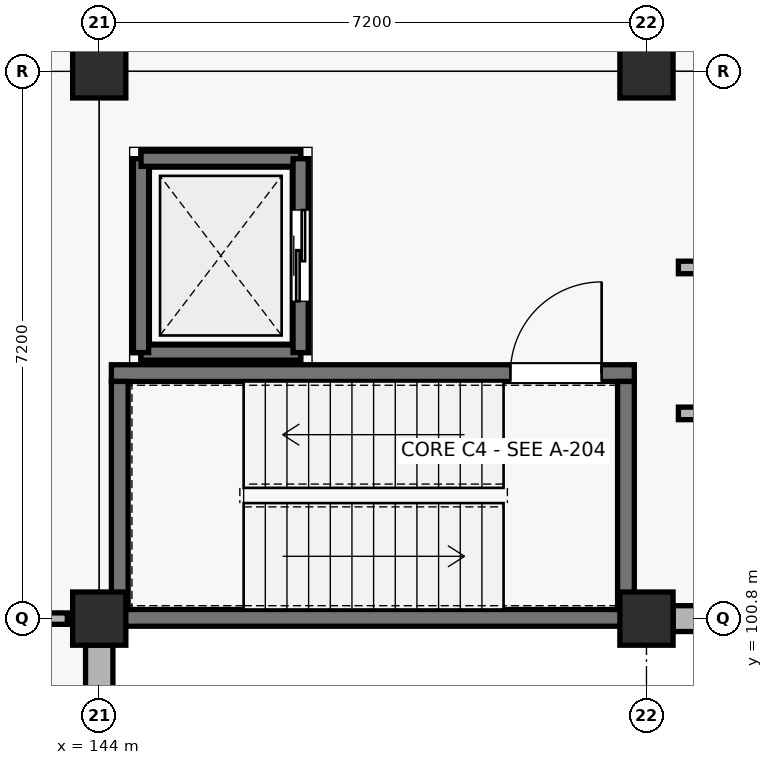
"""IFC4 building model, lengths in metres.
Left out: names, types, materials, properties, quantities, classifications, styles, units other than length and angle.
Written with IfcOpenShell. Run it as: python <this file> out.ifc"""

import sys

from ifc_helpers import new_model, si_unit, direction, frame, frame_2d, origin, origin_2d, place, context, subcontext, project, spatial, rectangle, extrude, element, fill, save


model = new_model("IFC4")
c1 = context("Model", 3, precision=1e-05, world=origin(), true_north=direction((0.0, 1.0)))
c2 = subcontext(c1, "Body", "Model", "MODEL_VIEW")
j1 = project(units=[si_unit("LENGTHUNIT", "METRE"), si_unit("PLANEANGLEUNIT", "RADIAN")], contexts=[c1])
p1 = place(None, origin())
s1 = spatial("IfcSite", under=j1, at=p1, CompositionType="ELEMENT")
p2 = place(p1, origin())
s2 = spatial("IfcBuilding", under=s1, at=p2, CompositionType="ELEMENT")
p3 = place(p2, origin())
s3 = spatial("IfcBuildingStorey", under=s2, at=p3, CompositionType="ELEMENT", Elevation=0.0)
for number, where, z_axis, x_axis in (
    (1, (144.0, 100.8, -0.25), (0.0, 0.0, 1.0), (1.0, 0.0, 0.0)),
    (2, (144.0, 108.0, -0.25), (0.0, 0.0, 1.0), (1.0, 0.0, 0.0)),
    (3, (151.2, 100.8, -0.25), (0.0, 0.0, 1.0), (1.0, 0.0, 0.0)),
    (4, (151.2, 108.0, -0.25), (0.0, 0.0, 1.0), (1.0, 0.0, 0.0)),
):
    element("IfcColumn", number, at=place(p3, frame(where, z_axis=z_axis, x_axis=x_axis)), inside=s3, PredefinedType="COLUMN", context=c2, shape_type="SweptSolid", body=[
        extrude(rectangle(XDim=0.7, YDim=0.7, at=origin_2d()), origin(), (0.0, 0.0, 1.0), 4.75),
    ])
p4 = place(p3, frame((144.0, 93.925, 0.0), z_axis=(0.0, 0.0, 1.0), x_axis=(0.0, 1.0, 0.0)))
e5 = element("IfcWall", 5, at=p4, inside=s3, PredefinedType="SOLIDWALL", context=c2, shape_type="SweptSolid", body=[
    extrude(rectangle(XDim=6.525, YDim=0.36, at=frame_2d((3.262, 0.0))), origin(), (0.0, 0.0, 1.0), 3.52),
])
p5 = place(p4, frame((1.0, 0.0, 0.9)))
e6 = element("IfcOpeningElement", 6, at=p5, cuts=e5, PredefinedType="OPENING", context=c2, shape_type="SweptSolid", body=[
    extrude(rectangle(XDim=1.5, YDim=1.25, at=frame_2d((0.75, 0.625))), frame((0.0, 0.19, 0.0), z_axis=(0.0, -1.0, 0.0), x_axis=(1.0, 0.0, 0.0)), (0.0, 0.0, 1.0), 0.38),
])
p6 = place(p4, frame((4.025, 0.0, 0.9)))
e7 = element("IfcOpeningElement", 7, at=p6, cuts=e5, PredefinedType="OPENING", context=c2, shape_type="SweptSolid", body=[
    extrude(rectangle(XDim=1.5, YDim=1.25, at=frame_2d((0.75, 0.625))), frame((0.0, 0.19, 0.0), z_axis=(0.0, -1.0, 0.0), x_axis=(1.0, 0.0, 0.0)), (0.0, 0.0, 1.0), 0.38),
])
p7 = place(p3, frame((151.55, 100.8, 0.0), z_axis=(0.0, 0.0, 1.0), x_axis=(1.0, 0.0, 0.0)))
e8 = element("IfcWall", 8, at=p7, inside=s3, PredefinedType="SOLIDWALL", context=c2, shape_type="SweptSolid", body=[
    extrude(rectangle(XDim=6.5, YDim=0.34, at=frame_2d((3.25, 0.0))), origin(), (0.0, 0.0, 1.0), 3.47),
])
p8 = place(p7, frame((1.225, 0.0, 0.9)))
e9 = element("IfcOpeningElement", 9, at=p8, cuts=e8, PredefinedType="OPENING", context=c2, shape_type="SweptSolid", body=[
    extrude(rectangle(XDim=1.05, YDim=1.75, at=frame_2d((0.525, 0.875))), frame((0.0, 0.18, 0.0), z_axis=(0.0, -1.0, 0.0), x_axis=(1.0, 0.0, 0.0)), (0.0, 0.0, 1.0), 0.36),
])
p9 = place(p7, frame((4.225, 0.0, 0.9)))
e10 = element("IfcOpeningElement", 10, at=p9, cuts=e8, PredefinedType="OPENING", context=c2, shape_type="SweptSolid", body=[
    extrude(rectangle(XDim=1.05, YDim=1.75, at=frame_2d((0.525, 0.875))), frame((0.0, 0.18, 0.0), z_axis=(0.0, -1.0, 0.0), x_axis=(1.0, 0.0, 0.0)), (0.0, 0.0, 1.0), 0.36),
])
p10 = place(p3, frame((144.55, 104.3, -0.95), z_axis=(0.0, 0.0, 1.0), x_axis=(1.0, 0.0, 0.0)))
e11 = element("IfcWall", 11, at=p10, inside=s3, PredefinedType="SHEAR", context=c2, shape_type="SweptSolid", body=[
    extrude(rectangle(XDim=2.1, YDim=0.22, at=frame_2d((1.05, 0.0))), origin(), (0.0, 0.0, 1.0), 0.95),
])
p11 = place(p3, frame((146.65, 104.3, -0.95), z_axis=(0.0, 0.0, 1.0), x_axis=(0.0, 1.0, 0.0)))
e12 = element("IfcWall", 12, at=p11, inside=s3, PredefinedType="SHEAR", context=c2, shape_type="SweptSolid", body=[
    extrude(rectangle(XDim=2.55, YDim=0.22, at=frame_2d((1.275, 0.0))), origin(), (0.0, 0.0, 1.0), 0.95),
])
p12 = place(p3, frame((146.65, 106.85, -0.95), z_axis=(0.0, 0.0, 1.0), x_axis=(-1.0, 0.0, 0.0)))
e13 = element("IfcWall", 13, at=p12, inside=s3, PredefinedType="SHEAR", context=c2, shape_type="SweptSolid", body=[
    extrude(rectangle(XDim=2.1, YDim=0.22, at=frame_2d((1.05, 0.0))), origin(), (0.0, 0.0, 1.0), 0.95),
])
p13 = place(p3, frame((144.55, 106.85, -0.95), z_axis=(0.0, 0.0, 1.0), x_axis=(0.0, -1.0, 0.0)))
e14 = element("IfcWall", 14, at=p13, inside=s3, PredefinedType="SHEAR", context=c2, shape_type="SweptSolid", body=[
    extrude(rectangle(XDim=2.55, YDim=0.22, at=frame_2d((1.275, 0.0))), origin(), (0.0, 0.0, 1.0), 0.95),
])
p14 = place(p3, frame((144.16, 100.81, -0.25), z_axis=(0.0, 0.0, 1.0), x_axis=(1.0, 0.0, 0.0)))
e15 = element("IfcWall", 15, at=p14, inside=s3, PredefinedType="SHEAR", context=c2, shape_type="SweptSolid", body=[
    extrude(rectangle(XDim=6.88, YDim=0.22, at=frame_2d((3.44, 0.0))), origin(), (0.0, 0.0, 1.0), 4.47),
])
p15 = place(p3, frame((144.16, 104.03, -0.25), z_axis=(0.0, 0.0, 1.0), x_axis=(1.0, 0.0, 0.0)))
e16 = element("IfcWall", 16, at=p15, inside=s3, PredefinedType="SHEAR", context=c2, shape_type="SweptSolid", body=[
    extrude(rectangle(XDim=6.88, YDim=0.22, at=frame_2d((3.44, 0.0))), origin(), (0.0, 0.0, 1.0), 4.47),
])
p16 = place(p15, frame((5.25, 0.0, 0.25)))
e17 = element("IfcOpeningElement", 17, at=p16, cuts=e16, PredefinedType="OPENING", context=c2, shape_type="SweptSolid", body=[
    extrude(rectangle(XDim=1.2, YDim=2.15, at=frame_2d((0.6, 1.075))), frame((0.0, 0.12, 0.0), z_axis=(0.0, -1.0, 0.0), x_axis=(1.0, 0.0, 0.0)), (0.0, 0.0, 1.0), 0.24),
])
for number, where, z_axis, x_axis in (
    (18, (144.27, 100.92, -0.25), (0.0, 0.0, 1.0), (0.0, 1.0, 0.0)),
    (19, (150.93, 100.92, -0.25), (0.0, 0.0, 1.0), (0.0, 1.0, 0.0)),
):
    element("IfcWall", number, at=place(p3, frame(where, z_axis=z_axis, x_axis=x_axis)), inside=s3, PredefinedType="SHEAR", context=c2, shape_type="SweptSolid", body=[
        extrude(rectangle(XDim=3.0, YDim=0.22, at=frame_2d((1.5, 0.0))), origin(), (0.0, 0.0, 1.0), 4.47),
    ])
p17 = place(p3, frame((144.55, 104.3, 0.0), z_axis=(0.0, 0.0, 1.0), x_axis=(1.0, 0.0, 0.0)))
e20 = element("IfcWall", 20, at=p17, inside=s3, PredefinedType="SHEAR", context=c2, shape_type="SweptSolid", body=[
    extrude(rectangle(XDim=2.1, YDim=0.2, at=frame_2d((1.05, 0.0))), origin(), (0.0, 0.0, 1.0), 4.22),
])
p18 = place(p3, frame((144.55, 104.3, 0.0), z_axis=(0.0, 0.0, 1.0), x_axis=(0.0, 1.0, 0.0)))
e21 = element("IfcWall", 21, at=p18, inside=s3, PredefinedType="SHEAR", context=c2, shape_type="SweptSolid", body=[
    extrude(rectangle(XDim=2.55, YDim=0.2, at=frame_2d((1.275, 0.0))), origin(), (0.0, 0.0, 1.0), 4.22),
])
p19 = place(p3, frame((144.55, 106.85, 0.0), z_axis=(0.0, 0.0, 1.0), x_axis=(1.0, 0.0, 0.0)))
e22 = element("IfcWall", 22, at=p19, inside=s3, PredefinedType="SHEAR", context=c2, shape_type="SweptSolid", body=[
    extrude(rectangle(XDim=2.1, YDim=0.2, at=frame_2d((1.05, 0.0))), origin(), (0.0, 0.0, 1.0), 4.22),
])
p20 = place(p3, frame((146.65, 104.3, 0.0), z_axis=(0.0, 0.0, 1.0), x_axis=(0.0, 1.0, 0.0)))
e23 = element("IfcWall", 23, at=p20, inside=s3, PredefinedType="SHEAR", context=c2, shape_type="SweptSolid", body=[
    extrude(rectangle(XDim=2.55, YDim=0.2, at=frame_2d((1.275, 0.0))), origin(), (0.0, 0.0, 1.0), 4.22),
])
p21 = place(p20, frame((0.675, 0.0, 0.0)))
e24 = element("IfcOpeningElement", 24, at=p21, cuts=e23, PredefinedType="OPENING", context=c2, shape_type="SweptSolid", body=[
    extrude(rectangle(XDim=1.2, YDim=2.15, at=frame_2d((0.6, 1.075))), frame((0.0, 0.11, 0.0), z_axis=(0.0, -1.0, 0.0), x_axis=(1.0, 0.0, 0.0)), (0.0, 0.0, 1.0), 0.22),
])
p22 = place(p3, frame((141.42, 100.8, 0.0), z_axis=(0.0, 0.0, 1.0), x_axis=(1.0, 0.0, 0.0)))
e25 = element("IfcWall", 25, at=p22, inside=s3, PredefinedType="PARTITIONING", context=c2, shape_type="SweptSolid", body=[
    extrude(rectangle(XDim=2.16, YDim=0.15, at=frame_2d((1.08, 0.0))), origin(), (0.0, 0.0, 1.0), 3.36),
])
p23 = place(p3, frame((151.62, 103.5, 0.0), z_axis=(0.0, 0.0, 1.0), x_axis=(1.0, 0.0, 0.0)))
e26 = element("IfcWall", 26, at=p23, inside=s3, PredefinedType="PARTITIONING", context=c2, shape_type="SweptSolid", body=[
    extrude(rectangle(XDim=6.36, YDim=0.165, at=frame_2d((3.18, 0.0))), origin(), (0.0, 0.0, 1.0), 3.36),
])
p24 = place(p23, frame((2.43, 0.0, 0.0)))
e27 = element("IfcOpeningElement", 27, at=p24, cuts=e26, PredefinedType="OPENING", context=c2, shape_type="SweptSolid", body=[
    extrude(rectangle(XDim=1.5, YDim=2.2, at=frame_2d((0.75, 1.1))), frame((0.0, 0.093, 0.0), z_axis=(0.0, -1.0, 0.0), x_axis=(1.0, 0.0, 0.0)), (0.0, 0.0, 1.0), 0.185),
])
p25 = place(p3, frame((151.62, 105.42, 0.0), z_axis=(0.0, 0.0, 1.0), x_axis=(1.0, 0.0, 0.0)))
e28 = element("IfcWall", 28, at=p25, inside=s3, PredefinedType="PARTITIONING", context=c2, shape_type="SweptSolid", body=[
    extrude(rectangle(XDim=6.36, YDim=0.165, at=frame_2d((3.18, 0.0))), origin(), (0.0, 0.0, 1.0), 3.36),
])
p26 = place(p25, frame((2.48, 0.0, 0.0)))
e29 = element("IfcOpeningElement", 29, at=p26, cuts=e28, PredefinedType="OPENING", context=c2, shape_type="SweptSolid", body=[
    extrude(rectangle(XDim=1.4, YDim=2.2, at=frame_2d((0.7, 1.1))), frame((0.0, 0.093, 0.0), z_axis=(0.0, -1.0, 0.0), x_axis=(1.0, 0.0, 0.0)), (0.0, 0.0, 1.0), 0.185),
])
p27 = place(p16, origin())
e30 = element("IfcDoor", 30, at=p27, inside=s3, OperationType="SINGLE_SWING_RIGHT", PredefinedType="DOOR", context=c2, shape_type="SweptSolid", body=[
    extrude(rectangle(XDim=1.2, YDim=2.15, at=frame_2d((0.6, 1.075))), frame((0.0, 0.025, 0.0), z_axis=(0.0, -1.0, 0.0), x_axis=(1.0, 0.0, 0.0)), (0.0, 0.0, 1.0), 0.05),
])
fill(e17, e30)
p28 = place(p21, origin())
e31 = element("IfcDoor", 31, at=p28, inside=s3, OperationType="SLIDING_TO_LEFT", PredefinedType="DOOR", context=c2, shape_type="SweptSolid", body=[
    extrude(rectangle(XDim=1.2, YDim=2.15, at=frame_2d((0.6, 1.075))), frame((0.0, 0.025, 0.0), z_axis=(0.0, -1.0, 0.0), x_axis=(1.0, 0.0, 0.0)), (0.0, 0.0, 1.0), 0.05),
])
fill(e24, e31)
save(model, sys.argv[1])
